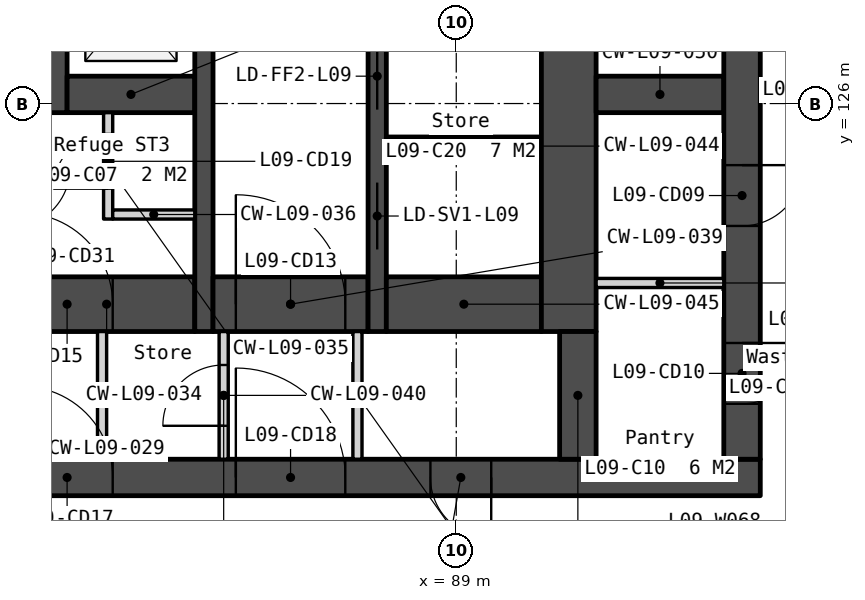
"""IFC4 building model, lengths in metres.
Left out: names, types, materials, properties, quantities, classifications, styles, units other than length and angle.
Written with IfcOpenShell. Run it as: python <this file> out.ifc"""

import sys

from ifc_helpers import new_model, si_unit, direction, frame, frame_2d, origin, place, context, subcontext, project, spatial, polyline, rectangle, outline, extrude, element, fill, save


model = new_model("IFC4")
c1 = context("Model", 3, precision=1e-05, world=origin(), true_north=direction((0.0, 1.0)))
c2 = subcontext(c1, "Body", "Model", "MODEL_VIEW")
j1 = project(units=[si_unit("LENGTHUNIT", "METRE"), si_unit("PLANEANGLEUNIT", "RADIAN")], contexts=[c1])
p1 = place(None, origin())
s1 = spatial("IfcSite", under=j1, at=p1, CompositionType="ELEMENT")
p2 = place(p1, origin())
s2 = spatial("IfcBuilding", under=s1, at=p2, CompositionType="ELEMENT")
p3 = place(p2, frame((0.0, 0.0, 45.5)))
s3 = spatial("IfcBuildingStorey", under=s2, at=p3, CompositionType="ELEMENT", Elevation=45.5)
p4 = place(p3, frame((66.0, 119.85, 0.0), z_axis=(0.0, 0.0, 1.0), x_axis=(1.0, 0.0, 0.0)))
e1 = element("IfcWall", 1, at=p4, inside=s3, PredefinedType="SOLIDWALL", context=c2, shape_type="SweptSolid", body=[
    extrude(rectangle(XDim=28.0, YDim=0.6, at=frame_2d((14.0, 0.0))), origin(), (0.0, 0.0, 1.0), 3.35),
])
p5 = place(p4, frame((6.825, 0.0, 0.0)))
e2 = element("IfcOpeningElement", 2, at=p5, cuts=e1, PredefinedType="OPENING", context=c2, shape_type="SweptSolid", body=[
    extrude(rectangle(XDim=1.8, YDim=2.1, at=frame_2d((0.9, 1.05))), frame((0.0, 0.31, 0.0), z_axis=(0.0, -1.0, 0.0), x_axis=(1.0, 0.0, 0.0)), (0.0, 0.0, 1.0), 0.62),
])
p6 = place(p4, frame((15.85, 0.0, 0.0)))
e3 = element("IfcOpeningElement", 3, at=p6, cuts=e1, PredefinedType="OPENING", context=c2, shape_type="SweptSolid", body=[
    extrude(rectangle(XDim=1.5, YDim=2.1, at=frame_2d((0.75, 1.05))), frame((0.0, 0.31, 0.0), z_axis=(0.0, -1.0, 0.0), x_axis=(1.0, 0.0, 0.0)), (0.0, 0.0, 1.0), 0.62),
])
p7 = place(p4, frame((19.375, 0.0, 0.0)))
e4 = element("IfcOpeningElement", 4, at=p7, cuts=e1, PredefinedType="OPENING", context=c2, shape_type="SweptSolid", body=[
    extrude(rectangle(XDim=1.8, YDim=2.1, at=frame_2d((0.9, 1.05))), frame((0.0, 0.31, 0.0), z_axis=(0.0, -1.0, 0.0), x_axis=(1.0, 0.0, 0.0)), (0.0, 0.0, 1.0), 0.62),
])
p8 = place(p4, frame((4.425, 0.0, 0.0)))
e5 = element("IfcOpeningElement", 5, at=p8, cuts=e1, PredefinedType="OPENING", context=c2, shape_type="SweptSolid", body=[
    extrude(rectangle(XDim=1.0, YDim=2.1, at=frame_2d((0.5, 1.05))), frame((0.0, 0.31, 0.0), z_axis=(0.0, -1.0, 0.0), x_axis=(1.0, 0.0, 0.0)), (0.0, 0.0, 1.0), 0.62),
])
p9 = place(p4, frame((9.783, 0.0, 0.0)))
e6 = element("IfcOpeningElement", 6, at=p9, cuts=e1, PredefinedType="OPENING", context=c2, shape_type="SweptSolid", body=[
    extrude(rectangle(XDim=1.0, YDim=2.1, at=frame_2d((0.5, 1.05))), frame((0.0, 0.31, 0.0), z_axis=(0.0, -1.0, 0.0), x_axis=(1.0, 0.0, 0.0)), (0.0, 0.0, 1.0), 0.62),
])
p10 = place(p4, frame((11.525, 0.0, 0.0)))
e7 = element("IfcOpeningElement", 7, at=p10, cuts=e1, PredefinedType="OPENING", context=c2, shape_type="SweptSolid", body=[
    extrude(rectangle(XDim=1.0, YDim=2.1, at=frame_2d((0.5, 1.05))), frame((0.0, 0.31, 0.0), z_axis=(0.0, -1.0, 0.0), x_axis=(1.0, 0.0, 0.0)), (0.0, 0.0, 1.0), 0.62),
])
p11 = place(p4, frame((13.658, 0.0, 0.0)))
e8 = element("IfcOpeningElement", 8, at=p11, cuts=e1, PredefinedType="OPENING", context=c2, shape_type="SweptSolid", body=[
    extrude(rectangle(XDim=1.0, YDim=2.1, at=frame_2d((0.5, 1.05))), frame((0.0, 0.31, 0.0), z_axis=(0.0, -1.0, 0.0), x_axis=(1.0, 0.0, 0.0)), (0.0, 0.0, 1.0), 0.62),
])
p12 = place(p4, frame((22.575, 0.0, 0.0)))
e9 = element("IfcOpeningElement", 9, at=p12, cuts=e1, PredefinedType="OPENING", context=c2, shape_type="SweptSolid", body=[
    extrude(rectangle(XDim=1.0, YDim=2.1, at=frame_2d((0.5, 1.05))), frame((0.0, 0.31, 0.0), z_axis=(0.0, -1.0, 0.0), x_axis=(1.0, 0.0, 0.0)), (0.0, 0.0, 1.0), 0.62),
])
p13 = place(p3, frame((81.8, 122.7, 0.0), z_axis=(0.0, 0.0, 1.0), x_axis=(1.0, 0.0, 0.0)))
e10 = element("IfcWall", 10, at=p13, inside=s3, PredefinedType="SOLIDWALL", context=c2, shape_type="SweptSolid", body=[
    extrude(rectangle(XDim=2.9, YDim=0.9, at=frame_2d((1.45, 0.0))), origin(), (0.0, 0.0, 1.0), 3.35),
])
p14 = place(p13, frame((0.05, 0.0, 0.0)))
e11 = element("IfcOpeningElement", 11, at=p14, cuts=e10, PredefinedType="OPENING", context=c2, shape_type="SweptSolid", body=[
    extrude(rectangle(XDim=1.5, YDim=2.1, at=frame_2d((0.75, 1.05))), frame((0.0, 0.46, 0.0), z_axis=(0.0, -1.0, 0.0), x_axis=(1.0, 0.0, 0.0)), (0.0, 0.0, 1.0), 0.92),
])
p15 = place(p3, frame((82.45, 133.95, 0.0), z_axis=(0.0, 0.0, 1.0), x_axis=(0.0, -1.0, 0.0)))
e12 = element("IfcWall", 12, at=p15, inside=s3, PredefinedType="SOLIDWALL", context=c2, shape_type="SweptSolid", body=[
    extrude(rectangle(XDim=8.1, YDim=0.3, at=frame_2d((4.05, 0.0))), origin(), (0.0, 0.0, 1.0), 3.35),
])
p16 = place(p15, frame((0.6, 0.0, 0.0)))
e13 = element("IfcOpeningElement", 13, at=p16, cuts=e12, PredefinedType="OPENING", context=c2, shape_type="SweptSolid", body=[
    extrude(rectangle(XDim=1.1, YDim=2.1, at=frame_2d((0.55, 1.05))), frame((0.0, 0.16, 0.0), z_axis=(0.0, -1.0, 0.0), x_axis=(1.0, 0.0, 0.0)), (0.0, 0.0, 1.0), 0.32),
])
p17 = place(p15, frame((3.2, 0.0, 0.0)))
e14 = element("IfcOpeningElement", 14, at=p17, cuts=e12, PredefinedType="OPENING", context=c2, shape_type="SweptSolid", body=[
    extrude(rectangle(XDim=1.1, YDim=2.1, at=frame_2d((0.55, 1.05))), frame((0.0, 0.16, 0.0), z_axis=(0.0, -1.0, 0.0), x_axis=(1.0, 0.0, 0.0)), (0.0, 0.0, 1.0), 0.32),
])
p18 = place(p15, frame((5.8, 0.0, 0.0)))
e15 = element("IfcOpeningElement", 15, at=p18, cuts=e12, PredefinedType="OPENING", context=c2, shape_type="SweptSolid", body=[
    extrude(rectangle(XDim=1.1, YDim=2.1, at=frame_2d((0.55, 1.05))), frame((0.0, 0.16, 0.0), z_axis=(0.0, -1.0, 0.0), x_axis=(1.0, 0.0, 0.0)), (0.0, 0.0, 1.0), 0.32),
])
p19 = place(p3, frame((82.6, 126.15, 0.0), z_axis=(0.0, 0.0, 1.0), x_axis=(1.0, 0.0, 0.0)))
e16 = element("IfcWall", 16, at=p19, inside=s3, PredefinedType="SOLIDWALL", context=c2, shape_type="SweptSolid", body=[
    extrude(rectangle(XDim=2.1, YDim=0.6, at=frame_2d((1.05, 0.0))), origin(), (0.0, 0.0, 1.0), 3.35),
])
p20 = place(p3, frame((83.175, 122.25, 0.0), z_axis=(0.0, 0.0, 1.0), x_axis=(0.0, -1.0, 0.0)))
e17 = element("IfcWall", 17, at=p20, inside=s3, PredefinedType="PARTITIONING", context=c2, shape_type="SweptSolid", body=[
    extrude(rectangle(XDim=2.1, YDim=0.15, at=frame_2d((1.05, 0.0))), origin(), (0.0, 0.0, 1.0), 3.35),
])
p21 = place(p3, frame((83.275, 125.85, 0.0), z_axis=(0.0, 0.0, 1.0), x_axis=(0.0, -1.0, 0.0)))
e18 = element("IfcWall", 18, at=p21, inside=s3, PredefinedType="PARTITIONING", context=c2, shape_type="SweptSolid", body=[
    extrude(rectangle(XDim=1.75, YDim=0.15, at=frame_2d((0.875, 0.0))), origin(), (0.0, 0.0, 1.0), 3.35),
])
p22 = place(p21, frame((0.35, 0.0, 0.0)))
e19 = element("IfcOpeningElement", 19, at=p22, cuts=e18, PredefinedType="OPENING", context=c2, shape_type="SweptSolid", body=[
    extrude(rectangle(XDim=0.9, YDim=2.1, at=frame_2d((0.45, 1.05))), frame((0.0, 0.085, 0.0), z_axis=(0.0, -1.0, 0.0), x_axis=(1.0, 0.0, 0.0)), (0.0, 0.0, 1.0), 0.17),
])
p23 = place(p3, frame((83.35, 124.175, 0.0), z_axis=(0.0, 0.0, 1.0), x_axis=(1.0, 0.0, 0.0)))
e20 = element("IfcWall", 20, at=p23, inside=s3, PredefinedType="PARTITIONING", context=c2, shape_type="SweptSolid", body=[
    extrude(rectangle(XDim=1.35, YDim=0.15, at=frame_2d((0.675, 0.0))), origin(), (0.0, 0.0, 1.0), 3.35),
])
p24 = place(p3, frame((84.85, 133.95, 0.0), z_axis=(0.0, 0.0, 1.0), x_axis=(0.0, -1.0, 0.0)))
e21 = element("IfcWall", 21, at=p24, inside=s3, PredefinedType="SOLIDWALL", context=c2, shape_type="SweptSolid", body=[
    extrude(rectangle(XDim=11.7, YDim=0.3, at=frame_2d((5.85, 0.0))), origin(), (0.0, 0.0, 1.0), 3.35),
])
p25 = place(p3, frame((85.0, 122.7, 0.0), z_axis=(0.0, 0.0, 1.0), x_axis=(1.0, 0.0, 0.0)))
e22 = element("IfcWall", 22, at=p25, inside=s3, PredefinedType="SOLIDWALL", context=c2, shape_type="SweptSolid", body=[
    extrude(rectangle(XDim=2.55, YDim=0.9, at=frame_2d((1.275, 0.0))), origin(), (0.0, 0.0, 1.0), 3.35),
])
p26 = place(p25, frame((0.375, 0.0, 0.0)))
e23 = element("IfcOpeningElement", 23, at=p26, cuts=e22, PredefinedType="OPENING", context=c2, shape_type="SweptSolid", body=[
    extrude(rectangle(XDim=1.8, YDim=2.1, at=frame_2d((0.9, 1.05))), frame((0.0, 0.46, 0.0), z_axis=(0.0, -1.0, 0.0), x_axis=(1.0, 0.0, 0.0)), (0.0, 0.0, 1.0), 0.92),
])
p27 = place(p3, frame((85.175, 122.25, 0.0), z_axis=(0.0, 0.0, 1.0), x_axis=(0.0, -1.0, 0.0)))
e24 = element("IfcWall", 24, at=p27, inside=s3, PredefinedType="PARTITIONING", context=c2, shape_type="SweptSolid", body=[
    extrude(rectangle(XDim=2.1, YDim=0.15, at=frame_2d((1.05, 0.0))), origin(), (0.0, 0.0, 1.0), 3.35),
])
p28 = place(p27, frame((0.55, 0.0, 0.0)))
e25 = element("IfcOpeningElement", 25, at=p28, cuts=e24, PredefinedType="OPENING", context=c2, shape_type="SweptSolid", body=[
    extrude(rectangle(XDim=1.0, YDim=2.1, at=frame_2d((0.5, 1.05))), frame((0.0, 0.085, 0.0), z_axis=(0.0, -1.0, 0.0), x_axis=(1.0, 0.0, 0.0)), (0.0, 0.0, 1.0), 0.17),
])
p29 = place(p3, frame((87.375, 122.25, 0.0), z_axis=(0.0, 0.0, 1.0), x_axis=(0.0, -1.0, 0.0)))
e26 = element("IfcWall", 26, at=p29, inside=s3, PredefinedType="PARTITIONING", context=c2, shape_type="SweptSolid", body=[
    extrude(rectangle(XDim=2.1, YDim=0.15, at=frame_2d((1.05, 0.0))), origin(), (0.0, 0.0, 1.0), 3.35),
])
p30 = place(p3, frame((87.7, 133.95, 0.0), z_axis=(0.0, 0.0, 1.0), x_axis=(0.0, -1.0, 0.0)))
e27 = element("IfcWall", 27, at=p30, inside=s3, PredefinedType="SOLIDWALL", context=c2, shape_type="SweptSolid", body=[
    extrude(rectangle(XDim=11.7, YDim=0.3, at=frame_2d((5.85, 0.0))), origin(), (0.0, 0.0, 1.0), 3.35),
])
p31 = place(p30, frame((6.95, 0.0, 0.0)))
e28 = element("IfcOpeningElement", 28, at=p31, cuts=e27, PredefinedType="OPENING", context=c2, shape_type="SweptSolid", body=[
    extrude(rectangle(XDim=1.1, YDim=2.1, at=frame_2d((0.55, 1.05))), frame((0.0, 0.16, 0.0), z_axis=(0.0, -1.0, 0.0), x_axis=(1.0, 0.0, 0.0)), (0.0, 0.0, 1.0), 0.32),
])
p32 = place(p30, frame((5.1, 0.0, 0.0)))
e29 = element("IfcOpeningElement", 29, at=p32, cuts=e27, PredefinedType="OPENING", context=c2, shape_type="SweptSolid", body=[
    extrude(rectangle(XDim=1.0, YDim=2.1, at=frame_2d((0.5, 1.05))), frame((0.0, 0.16, 0.0), z_axis=(0.0, -1.0, 0.0), x_axis=(1.0, 0.0, 0.0)), (0.0, 0.0, 1.0), 0.32),
])
p33 = place(p30, frame((9.25, 0.0, 0.0)))
e30 = element("IfcOpeningElement", 30, at=p33, cuts=e27, PredefinedType="OPENING", context=c2, shape_type="SweptSolid", body=[
    extrude(rectangle(XDim=1.1, YDim=2.1, at=frame_2d((0.55, 1.05))), frame((0.0, 0.16, 0.0), z_axis=(0.0, -1.0, 0.0), x_axis=(1.0, 0.0, 0.0)), (0.0, 0.0, 1.0), 0.32),
])
p34 = place(p3, frame((87.85, 125.3, 0.0), z_axis=(0.0, 0.0, 1.0), x_axis=(1.0, 0.0, 0.0)))
e31 = element("IfcWall", 31, at=p34, inside=s3, PredefinedType="SOLIDWALL", context=c2, shape_type="SweptSolid", body=[
    extrude(rectangle(XDim=2.55, YDim=0.3, at=frame_2d((1.275, 0.0))), origin(), (0.0, 0.0, 1.0), 3.35),
])
p35 = place(p3, frame((87.85, 122.7, 0.0), z_axis=(0.0, 0.0, 1.0), x_axis=(1.0, 0.0, 0.0)))
e32 = element("IfcWall", 32, at=p35, inside=s3, PredefinedType="SOLIDWALL", context=c2, shape_type="SweptSolid", body=[
    extrude(rectangle(XDim=2.55, YDim=0.9, at=frame_2d((1.275, 0.0))), origin(), (0.0, 0.0, 1.0), 3.35),
])
p36 = place(p3, frame((90.85, 133.95, 0.0), z_axis=(0.0, 0.0, 1.0), x_axis=(0.0, -1.0, 0.0)))
e33 = element("IfcWall", 33, at=p36, inside=s3, PredefinedType="SOLIDWALL", context=c2, shape_type="SweptSolid", body=[
    extrude(rectangle(XDim=11.7, YDim=0.9, at=frame_2d((5.85, 0.0))), origin(), (0.0, 0.0, 1.0), 3.35),
])
p37 = place(p3, frame((91.0, 122.25, 0.0), z_axis=(0.0, 0.0, 1.0), x_axis=(0.0, -1.0, 0.0)))
e34 = element("IfcWall", 34, at=p37, inside=s3, PredefinedType="SOLIDWALL", context=c2, shape_type="SweptSolid", body=[
    extrude(rectangle(XDim=2.1, YDim=0.6, at=frame_2d((1.05, 0.0))), origin(), (0.0, 0.0, 1.0), 3.35),
])
p38 = place(p3, frame((91.3, 126.15, 0.0), z_axis=(0.0, 0.0, 1.0), x_axis=(1.0, 0.0, 0.0)))
e35 = element("IfcWall", 35, at=p38, inside=s3, PredefinedType="SOLIDWALL", context=c2, shape_type="SweptSolid", body=[
    extrude(rectangle(XDim=2.1, YDim=0.6, at=frame_2d((1.05, 0.0))), origin(), (0.0, 0.0, 1.0), 3.35),
])
p39 = place(p3, frame((91.3, 123.049, 0.0), z_axis=(0.0, 0.0, 1.0), x_axis=(1.0, 0.0, 0.0)))
e36 = element("IfcWall", 36, at=p39, inside=s3, PredefinedType="PARTITIONING", context=c2, shape_type="SweptSolid", body=[
    extrude(rectangle(XDim=2.1, YDim=0.15, at=frame_2d((1.05, 0.0))), origin(), (0.0, 0.0, 1.0), 3.35),
])
p40 = place(p3, frame((93.7, 133.95, 0.0), z_axis=(0.0, 0.0, 1.0), x_axis=(0.0, -1.0, 0.0)))
e37 = element("IfcWall", 37, at=p40, inside=s3, PredefinedType="SOLIDWALL", context=c2, shape_type="SweptSolid", body=[
    extrude(rectangle(XDim=13.8, YDim=0.6, at=frame_2d((6.9, 0.0))), origin(), (0.0, 0.0, 1.0), 3.35),
])
p41 = place(p40, frame((0.6, 0.0, 0.0)))
e38 = element("IfcOpeningElement", 38, at=p41, cuts=e37, PredefinedType="OPENING", context=c2, shape_type="SweptSolid", body=[
    extrude(rectangle(XDim=1.1, YDim=2.1, at=frame_2d((0.55, 1.05))), frame((0.0, 0.31, 0.0), z_axis=(0.0, -1.0, 0.0), x_axis=(1.0, 0.0, 0.0)), (0.0, 0.0, 1.0), 0.62),
])
p42 = place(p40, frame((8.963, 0.0, 0.0)))
e39 = element("IfcOpeningElement", 39, at=p42, cuts=e37, PredefinedType="OPENING", context=c2, shape_type="SweptSolid", body=[
    extrude(rectangle(XDim=1.0, YDim=2.1, at=frame_2d((0.5, 1.05))), frame((0.0, 0.31, 0.0), z_axis=(0.0, -1.0, 0.0), x_axis=(1.0, 0.0, 0.0)), (0.0, 0.0, 1.0), 0.62),
])
p43 = place(p40, frame((11.888, 0.0, 0.0)))
e40 = element("IfcOpeningElement", 40, at=p43, cuts=e37, PredefinedType="OPENING", context=c2, shape_type="SweptSolid", body=[
    extrude(rectangle(XDim=1.0, YDim=2.1, at=frame_2d((0.5, 1.05))), frame((0.0, 0.31, 0.0), z_axis=(0.0, -1.0, 0.0), x_axis=(1.0, 0.0, 0.0)), (0.0, 0.0, 1.0), 0.62),
])
p44 = place(p3, frame((83.105, 90.599, -0.15), z_axis=(0.0, 0.0, 1.0), x_axis=(0.499999201451, 0.866025864826, 0.0)))
e41 = element("IfcWall", 41, at=p44, inside=s3, PredefinedType="SOLIDWALL", context=c2, shape_type="SweptSolid", body=[
    extrude(outline(polyline([(44.8, 0.0), (44.8, 3.5), (0.0, 3.5), (0.0, 0.0), (44.8, 0.0)])), frame((0.0, 0.225, 0.0), z_axis=(0.0, -1.0, 0.0), x_axis=(1.0, 0.0, 0.0)), (0.0, 0.0, 1.0), 0.45),
])
p45 = place(p44, frame((3.03, 0.0, 1.05)))
e42 = element("IfcOpeningElement", 42, at=p45, cuts=e41, PredefinedType="OPENING", context=c2, shape_type="SweptSolid", body=[
    extrude(rectangle(XDim=1.2, YDim=1.5, at=frame_2d((0.6, 0.75))), frame((0.0, 0.235, 0.0), z_axis=(0.0, -1.0, 0.0), x_axis=(1.0, 0.0, 0.0)), (0.0, 0.0, 1.0), 0.47),
])
p46 = place(p44, frame((4.73, 0.0, 1.05)))
e43 = element("IfcOpeningElement", 43, at=p46, cuts=e41, PredefinedType="OPENING", context=c2, shape_type="SweptSolid", body=[
    extrude(rectangle(XDim=1.2, YDim=1.5, at=frame_2d((0.6, 0.75))), frame((0.0, 0.235, 0.0), z_axis=(0.0, -1.0, 0.0), x_axis=(1.0, 0.0, 0.0)), (0.0, 0.0, 1.0), 0.47),
])
p47 = place(p44, frame((11.99, 0.0, 1.05)))
e44 = element("IfcOpeningElement", 44, at=p47, cuts=e41, PredefinedType="OPENING", context=c2, shape_type="SweptSolid", body=[
    extrude(rectangle(XDim=1.2, YDim=1.5, at=frame_2d((0.6, 0.75))), frame((0.0, 0.235, 0.0), z_axis=(0.0, -1.0, 0.0), x_axis=(1.0, 0.0, 0.0)), (0.0, 0.0, 1.0), 0.47),
])
p48 = place(p44, frame((13.69, 0.0, 1.05)))
e45 = element("IfcOpeningElement", 45, at=p48, cuts=e41, PredefinedType="OPENING", context=c2, shape_type="SweptSolid", body=[
    extrude(rectangle(XDim=1.2, YDim=1.5, at=frame_2d((0.6, 0.75))), frame((0.0, 0.235, 0.0), z_axis=(0.0, -1.0, 0.0), x_axis=(1.0, 0.0, 0.0)), (0.0, 0.0, 1.0), 0.47),
])
p49 = place(p44, frame((20.95, 0.0, 1.05)))
e46 = element("IfcOpeningElement", 46, at=p49, cuts=e41, PredefinedType="OPENING", context=c2, shape_type="SweptSolid", body=[
    extrude(rectangle(XDim=1.2, YDim=1.5, at=frame_2d((0.6, 0.75))), frame((0.0, 0.235, 0.0), z_axis=(0.0, -1.0, 0.0), x_axis=(1.0, 0.0, 0.0)), (0.0, 0.0, 1.0), 0.47),
])
p50 = place(p44, frame((22.65, 0.0, 1.05)))
e47 = element("IfcOpeningElement", 47, at=p50, cuts=e41, PredefinedType="OPENING", context=c2, shape_type="SweptSolid", body=[
    extrude(rectangle(XDim=1.2, YDim=1.5, at=frame_2d((0.6, 0.75))), frame((0.0, 0.235, 0.0), z_axis=(0.0, -1.0, 0.0), x_axis=(1.0, 0.0, 0.0)), (0.0, 0.0, 1.0), 0.47),
])
p51 = place(p44, frame((29.91, 0.0, 1.05)))
e48 = element("IfcOpeningElement", 48, at=p51, cuts=e41, PredefinedType="OPENING", context=c2, shape_type="SweptSolid", body=[
    extrude(rectangle(XDim=1.2, YDim=1.5, at=frame_2d((0.6, 0.75))), frame((0.0, 0.235, 0.0), z_axis=(0.0, -1.0, 0.0), x_axis=(1.0, 0.0, 0.0)), (0.0, 0.0, 1.0), 0.47),
])
p52 = place(p44, frame((31.61, 0.0, 1.05)))
e49 = element("IfcOpeningElement", 49, at=p52, cuts=e41, PredefinedType="OPENING", context=c2, shape_type="SweptSolid", body=[
    extrude(rectangle(XDim=1.2, YDim=1.5, at=frame_2d((0.6, 0.75))), frame((0.0, 0.235, 0.0), z_axis=(0.0, -1.0, 0.0), x_axis=(1.0, 0.0, 0.0)), (0.0, 0.0, 1.0), 0.47),
])
p53 = place(p44, frame((38.87, 0.0, 1.05)))
e50 = element("IfcOpeningElement", 50, at=p53, cuts=e41, PredefinedType="OPENING", context=c2, shape_type="SweptSolid", body=[
    extrude(rectangle(XDim=1.2, YDim=1.5, at=frame_2d((0.6, 0.75))), frame((0.0, 0.235, 0.0), z_axis=(0.0, -1.0, 0.0), x_axis=(1.0, 0.0, 0.0)), (0.0, 0.0, 1.0), 0.47),
])
p54 = place(p44, frame((40.57, 0.0, 1.05)))
e51 = element("IfcOpeningElement", 51, at=p54, cuts=e41, PredefinedType="OPENING", context=c2, shape_type="SweptSolid", body=[
    extrude(rectangle(XDim=1.2, YDim=1.5, at=frame_2d((0.6, 0.75))), frame((0.0, 0.235, 0.0), z_axis=(0.0, -1.0, 0.0), x_axis=(1.0, 0.0, 0.0)), (0.0, 0.0, 1.0), 0.47),
])
p55 = place(p42, origin())
e52 = element("IfcDoor", 52, at=p55, inside=s3, OperationType="SINGLE_SWING_LEFT", PredefinedType="DOOR", context=c2, shape_type="SweptSolid", body=[
    extrude(rectangle(XDim=1.0, YDim=2.1, at=frame_2d((0.5, 1.05))), frame((0.0, 0.025, 0.0), z_axis=(0.0, -1.0, 0.0), x_axis=(1.0, 0.0, 0.0)), (0.0, 0.0, 1.0), 0.05),
])
fill(e39, e52)
p56 = place(p43, origin())
e53 = element("IfcDoor", 53, at=p56, inside=s3, OperationType="SINGLE_SWING_LEFT", PredefinedType="DOOR", context=c2, shape_type="SweptSolid", body=[
    extrude(rectangle(XDim=1.0, YDim=2.1, at=frame_2d((0.5, 1.05))), frame((0.0, 0.025, 0.0), z_axis=(0.0, -1.0, 0.0), x_axis=(1.0, 0.0, 0.0)), (0.0, 0.0, 1.0), 0.05),
])
fill(e40, e53)
p57 = place(p31, origin())
e54 = element("IfcDoor", 54, at=p57, inside=s3, OperationType="SLIDING_TO_LEFT", PredefinedType="DOOR", context=c2, shape_type="SweptSolid", body=[
    extrude(rectangle(XDim=1.1, YDim=2.1, at=frame_2d((0.55, 1.05))), frame((0.0, 0.025, 0.0), z_axis=(0.0, -1.0, 0.0), x_axis=(1.0, 0.0, 0.0)), (0.0, 0.0, 1.0), 0.05),
])
fill(e28, e54)
p58 = place(p26, origin())
e55 = element("IfcDoor", 55, at=p58, inside=s3, OperationType="DOUBLE_DOOR_DOUBLE_SWING", PredefinedType="DOOR", context=c2, shape_type="SweptSolid", body=[
    extrude(rectangle(XDim=1.8, YDim=2.1, at=frame_2d((0.9, 1.05))), frame((0.0, 0.025, 0.0), z_axis=(0.0, -1.0, 0.0), x_axis=(1.0, 0.0, 0.0)), (0.0, 0.0, 1.0), 0.05),
])
fill(e23, e55)
p59 = place(p14, origin())
e56 = element("IfcDoor", 56, at=p59, inside=s3, OperationType="DOUBLE_DOOR_DOUBLE_SWING", PredefinedType="DOOR", context=c2, shape_type="SweptSolid", body=[
    extrude(rectangle(XDim=1.5, YDim=2.1, at=frame_2d((0.75, 1.05))), frame((0.0, 0.025, 0.0), z_axis=(0.0, -1.0, 0.0), x_axis=(1.0, 0.0, 0.0)), (0.0, 0.0, 1.0), 0.05),
])
fill(e11, e56)
p60 = place(p6, origin())
e57 = element("IfcDoor", 57, at=p60, inside=s3, OperationType="DOUBLE_DOOR_DOUBLE_SWING", PredefinedType="DOOR", context=c2, shape_type="SweptSolid", body=[
    extrude(rectangle(XDim=1.5, YDim=2.1, at=frame_2d((0.75, 1.05))), frame((0.0, 0.025, 0.0), z_axis=(0.0, -1.0, 0.0), x_axis=(1.0, 0.0, 0.0)), (0.0, 0.0, 1.0), 0.05),
])
fill(e3, e57)
p61 = place(p7, origin())
e58 = element("IfcDoor", 58, at=p61, inside=s3, OperationType="DOUBLE_DOOR_DOUBLE_SWING", PredefinedType="DOOR", context=c2, shape_type="SweptSolid", body=[
    extrude(rectangle(XDim=1.8, YDim=2.1, at=frame_2d((0.9, 1.05))), frame((0.0, 0.025, 0.0), z_axis=(0.0, -1.0, 0.0), x_axis=(1.0, 0.0, 0.0)), (0.0, 0.0, 1.0), 0.05),
])
fill(e4, e58)
p62 = place(p22, origin())
e59 = element("IfcDoor", 59, at=p62, inside=s3, OperationType="SINGLE_SWING_RIGHT", PredefinedType="DOOR", context=c2, shape_type="SweptSolid", body=[
    extrude(rectangle(XDim=0.9, YDim=2.1, at=frame_2d((0.45, 1.05))), frame((0.0, 0.025, 0.0), z_axis=(0.0, -1.0, 0.0), x_axis=(1.0, 0.0, 0.0)), (0.0, 0.0, 1.0), 0.05),
])
fill(e19, e59)
p63 = place(p28, origin())
e60 = element("IfcDoor", 60, at=p63, inside=s3, OperationType="SINGLE_SWING_RIGHT", PredefinedType="DOOR", context=c2, shape_type="SweptSolid", body=[
    extrude(rectangle(XDim=1.0, YDim=2.1, at=frame_2d((0.5, 1.05))), frame((0.0, 0.025, 0.0), z_axis=(0.0, -1.0, 0.0), x_axis=(1.0, 0.0, 0.0)), (0.0, 0.0, 1.0), 0.05),
])
fill(e25, e60)
p64 = place(p12, origin())
e61 = element("IfcDoor", 61, at=p64, inside=s3, OperationType="SINGLE_SWING_RIGHT", PredefinedType="DOOR", context=c2, shape_type="SweptSolid", body=[
    extrude(rectangle(XDim=1.0, YDim=2.1, at=frame_2d((0.5, 1.05))), frame((0.0, 0.025, 0.0), z_axis=(0.0, -1.0, 0.0), x_axis=(1.0, 0.0, 0.0)), (0.0, 0.0, 1.0), 0.05),
])
fill(e9, e61)
p65 = place(p33, origin())
e62 = element("IfcDoor", 62, at=p65, inside=s3, OperationType="SLIDING_TO_LEFT", PredefinedType="DOOR", context=c2, shape_type="SweptSolid", body=[
    extrude(rectangle(XDim=1.1, YDim=2.1, at=frame_2d((0.55, 1.05))), frame((0.0, 0.025, 0.0), z_axis=(0.0, -1.0, 0.0), x_axis=(1.0, 0.0, 0.0)), (0.0, 0.0, 1.0), 0.05),
])
fill(e30, e62)
save(model, sys.argv[1])
